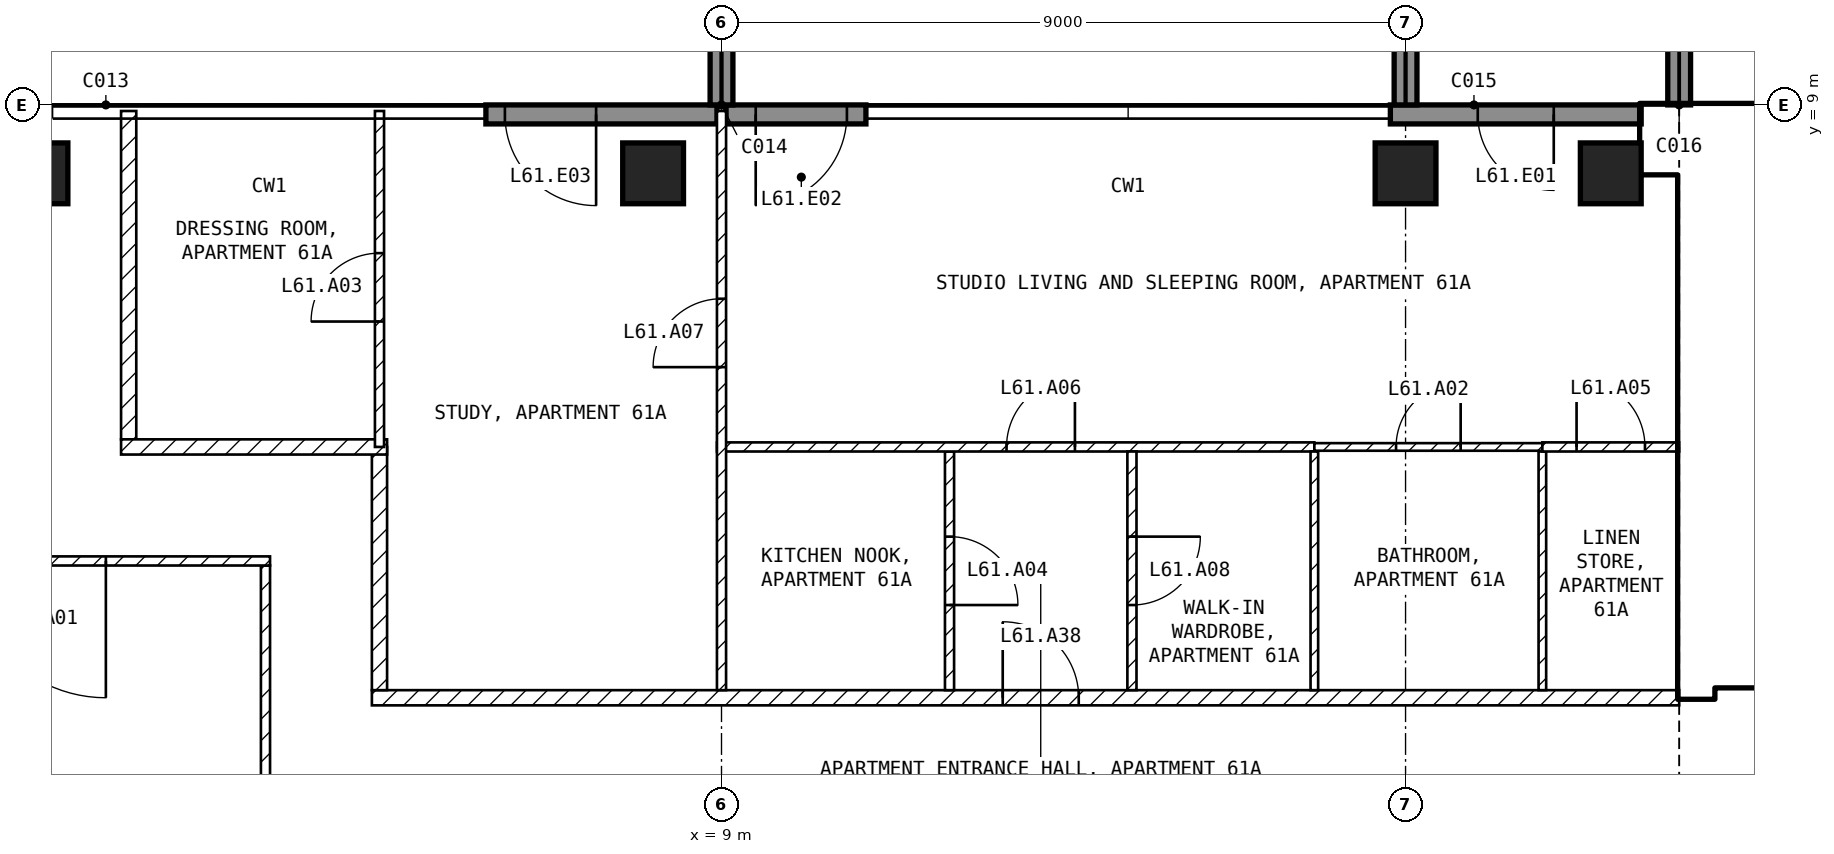
"""IFC4 building model, lengths in metres.
Left out: names, types, materials, properties, quantities, classifications, styles, units other than length and angle.
Written with IfcOpenShell. Run it as: python <this file> out.ifc"""

import sys

from ifc_helpers import new_model, si_unit, direction, frame, frame_2d, origin, origin_2d, place, context, subcontext, project, spatial, rectangle, extrude, element, fill, save


model = new_model("IFC4")
c1 = context("Model", 3, precision=1e-05, world=origin(), true_north=direction((0.0, 1.0)))
c2 = subcontext(c1, "Body", "Model", "MODEL_VIEW")
j1 = project(units=[si_unit("LENGTHUNIT", "METRE"), si_unit("PLANEANGLEUNIT", "RADIAN")], contexts=[c1])
p1 = place(None, origin())
s1 = spatial("IfcSite", under=j1, at=p1, CompositionType="ELEMENT")
p2 = place(p1, origin())
s2 = spatial("IfcBuilding", under=s1, at=p2, CompositionType="ELEMENT")
p3 = place(p2, frame((0.0, 0.0, 243.0)))
s3 = spatial("IfcBuildingStorey", under=s2, at=p3, CompositionType="ELEMENT", Elevation=243.0)
for number, where, z_axis, x_axis in (
    (1, (0.0, 8.1, -0.25), (0.0, 0.0, 1.0), (1.0, 0.0, 0.0)),
    (2, (8.1, 8.1, -0.25), (0.0, 0.0, 1.0), (1.0, 0.0, 0.0)),
    (3, (18.0, 8.1, -0.25), (0.0, 0.0, 1.0), (1.0, 0.0, 0.0)),
    (4, (20.7, 8.1, -0.25), (0.0, 0.0, 1.0), (1.0, 0.0, 0.0)),
):
    element("IfcColumn", number, at=place(p3, frame(where, z_axis=z_axis, x_axis=x_axis)), inside=s3, PredefinedType="COLUMN", context=c2, shape_type="SweptSolid", body=[
        extrude(rectangle(XDim=0.8, YDim=0.8, at=origin_2d()), origin(), (0.0, 0.0, 1.0), 3.5),
    ])
p4 = place(p3, frame((21.1, 8.875, 0.0), z_axis=(0.0, 0.0, 1.0), x_axis=(-1.0, 0.0, 0.0)))
e5 = element("IfcWall", 5, at=p4, inside=s3, PredefinedType="SOLIDWALL", context=c2, shape_type="SweptSolid", body=[
    extrude(rectangle(XDim=3.3, YDim=0.25, at=frame_2d((1.65, 0.0))), origin(), (0.0, 0.0, 1.0), 3.25),
])
p5 = place(p4, frame((1.15, 0.0, 0.0)))
e6 = element("IfcOpeningElement", 6, at=p5, cuts=e5, PredefinedType="OPENING", context=c2, shape_type="SweptSolid", body=[
    extrude(rectangle(XDim=1.0, YDim=2.4, at=frame_2d((0.5, 1.2))), frame((0.0, 0.135, 0.0), z_axis=(0.0, -1.0, 0.0), x_axis=(1.0, 0.0, 0.0)), (0.0, 0.0, 1.0), 0.27),
])
p6 = place(p3, frame((10.9, 8.875, 0.0), z_axis=(0.0, 0.0, 1.0), x_axis=(-1.0, 0.0, 0.0)))
e7 = element("IfcWall", 7, at=p6, inside=s3, PredefinedType="SOLIDWALL", context=c2, shape_type="SweptSolid", body=[
    extrude(rectangle(XDim=1.84, YDim=0.25, at=frame_2d((0.92, 0.0))), origin(), (0.0, 0.0, 1.0), 3.25),
])
p7 = place(p6, frame((0.25, 0.0, 0.0)))
e8 = element("IfcOpeningElement", 8, at=p7, cuts=e7, PredefinedType="OPENING", context=c2, shape_type="SweptSolid", body=[
    extrude(rectangle(XDim=1.2, YDim=2.4, at=frame_2d((0.6, 1.2))), frame((0.0, 0.135, 0.0), z_axis=(0.0, -1.0, 0.0), x_axis=(1.0, 0.0, 0.0)), (0.0, 0.0, 1.0), 0.27),
])
p8 = place(p3, frame((8.94, 8.875, 0.0), z_axis=(0.0, 0.0, 1.0), x_axis=(-1.0, 0.0, 0.0)))
e9 = element("IfcWall", 9, at=p8, inside=s3, PredefinedType="SOLIDWALL", context=c2, shape_type="SweptSolid", body=[
    extrude(rectangle(XDim=3.04, YDim=0.25, at=frame_2d((1.52, 0.0))), origin(), (0.0, 0.0, 1.0), 3.25),
])
p9 = place(p8, frame((1.59, 0.0, 0.0)))
e10 = element("IfcOpeningElement", 10, at=p9, cuts=e9, PredefinedType="OPENING", context=c2, shape_type="SweptSolid", body=[
    extrude(rectangle(XDim=1.2, YDim=2.4, at=frame_2d((0.6, 1.2))), frame((0.0, 0.135, 0.0), z_axis=(0.0, -1.0, 0.0), x_axis=(1.0, 0.0, 0.0)), (0.0, 0.0, 1.0), 0.27),
])
for number, where, z_axis, x_axis in (
    (11, (9.0, 9.0, 0.0), (0.0, 0.0, 1.0), (0.0, 1.0, 0.0)),
    (12, (18.0, 9.0, 0.0), (0.0, 0.0, 1.0), (0.0, 1.0, 0.0)),
    (13, (21.6, 9.0, 0.0), (0.0, 0.0, 1.0), (0.0, 1.0, 0.0)),
):
    element("IfcWall", number, at=place(p3, frame(where, z_axis=z_axis, x_axis=x_axis)), inside=s3, PredefinedType="SOLIDWALL", context=c2, shape_type="SweptSolid", body=[
        extrude(rectangle(XDim=2.7, YDim=0.3, at=frame_2d((1.35, 0.0))), origin(), (0.0, 0.0, 1.0), 3.25),
    ])
p10 = place(p3, frame((21.1, 8.55, 0.0), z_axis=(0.0, 0.0, 1.0), x_axis=(1.0, 0.0, 0.0)))
e14 = element("IfcWall", 14, at=p10, inside=s3, PredefinedType="SHEAR", context=c2, shape_type="SweptSolid", body=[
    extrude(rectangle(XDim=8.65, YDim=0.9, at=frame_2d((4.325, 0.0))), origin(), (0.0, 0.0, 1.0), 3.25),
])
p11 = place(p3, frame((21.825, 1.2, 0.0), z_axis=(0.0, 0.0, 1.0), x_axis=(0.0, 1.0, 0.0)))
e15 = element("IfcWall", 15, at=p11, inside=s3, PredefinedType="SHEAR", context=c2, shape_type="SweptSolid", body=[
    extrude(rectangle(XDim=6.9, YDim=0.45, at=frame_2d((3.45, 0.0))), origin(), (0.0, 0.0, 1.0), 3.25),
])
p12 = place(p3, frame((22.05, 1.45, 0.0), z_axis=(0.0, 0.0, 1.0), x_axis=(1.0, 0.0, 0.0)))
e16 = element("IfcWall", 16, at=p12, inside=s3, PredefinedType="SOLIDWALL", context=c2, shape_type="SweptSolid", body=[
    extrude(rectangle(XDim=11.3, YDim=0.2, at=frame_2d((5.65, 0.0))), origin(), (0.0, 0.0, 1.0), 3.25),
])
p13 = place(p12, frame((0.75, 0.0, 0.0)))
e17 = element("IfcOpeningElement", 17, at=p13, cuts=e16, PredefinedType="OPENING", context=c2, shape_type="SweptSolid", body=[
    extrude(rectangle(XDim=1.0, YDim=2.1, at=frame_2d((0.5, 1.05))), frame((0.0, 0.11, 0.0), z_axis=(0.0, -1.0, 0.0), x_axis=(1.0, 0.0, 0.0)), (0.0, 0.0, 1.0), 0.22),
])
p14 = place(p12, frame((3.25, 0.0, 0.0)))
e18 = element("IfcOpeningElement", 18, at=p14, cuts=e16, PredefinedType="OPENING", context=c2, shape_type="SweptSolid", body=[
    extrude(rectangle(XDim=1.0, YDim=2.1, at=frame_2d((0.5, 1.05))), frame((0.0, 0.11, 0.0), z_axis=(0.0, -1.0, 0.0), x_axis=(1.0, 0.0, 0.0)), (0.0, 0.0, 1.0), 0.22),
])
p15 = place(p12, frame((9.225, 0.0, 0.0)))
e19 = element("IfcOpeningElement", 19, at=p15, cuts=e16, PredefinedType="OPENING", context=c2, shape_type="SweptSolid", body=[
    extrude(rectangle(XDim=0.9, YDim=2.1, at=frame_2d((0.45, 1.05))), frame((0.0, 0.11, 0.0), z_axis=(0.0, -1.0, 0.0), x_axis=(1.0, 0.0, 0.0)), (0.0, 0.0, 1.0), 0.22),
])
p16 = place(p3, frame((22.05, 5.15, 0.0), z_axis=(0.0, 0.0, 1.0), x_axis=(1.0, 0.0, 0.0)))
e20 = element("IfcWall", 20, at=p16, inside=s3, PredefinedType="SOLIDWALL", context=c2, shape_type="SweptSolid", body=[
    extrude(rectangle(XDim=6.3, YDim=0.2, at=frame_2d((3.15, 0.0))), origin(), (0.0, 0.0, 1.0), 3.25),
])
p17 = place(p16, frame((0.2, 0.0, 0.0)))
e21 = element("IfcOpeningElement", 21, at=p17, cuts=e20, PredefinedType="OPENING", context=c2, shape_type="SweptSolid", body=[
    extrude(rectangle(XDim=1.0, YDim=2.1, at=frame_2d((0.5, 1.05))), frame((0.0, 0.11, 0.0), z_axis=(0.0, -1.0, 0.0), x_axis=(1.0, 0.0, 0.0)), (0.0, 0.0, 1.0), 0.22),
])
p18 = place(p3, frame((3.0, -2.94, 0.0), z_axis=(0.0, 0.0, 1.0), x_axis=(0.0, 1.0, 0.0)))
e22 = element("IfcWall", 22, at=p18, inside=s3, PredefinedType="PARTITIONING", context=c2, shape_type="SweptSolid", body=[
    extrude(rectangle(XDim=5.88, YDim=0.12, at=frame_2d((2.94, 0.0))), origin(), (0.0, 0.0, 1.0), 3.25),
])
p19 = place(p3, frame((3.06, 3.0, 0.0), z_axis=(0.0, 0.0, 1.0), x_axis=(-1.0, 0.0, 0.0)))
e23 = element("IfcWall", 23, at=p19, inside=s3, PredefinedType="PARTITIONING", context=c2, shape_type="SweptSolid", body=[
    extrude(rectangle(XDim=6.12, YDim=0.12, at=frame_2d((3.06, 0.0))), origin(), (0.0, 0.0, 1.0), 3.25),
])
p20 = place(p19, frame((2.16, 0.0, 0.0)))
e24 = element("IfcOpeningElement", 24, at=p20, cuts=e23, PredefinedType="OPENING", context=c2, shape_type="SweptSolid", body=[
    extrude(rectangle(XDim=1.8, YDim=2.1, at=frame_2d((0.9, 1.05))), frame((0.0, 0.07, 0.0), z_axis=(0.0, -1.0, 0.0), x_axis=(1.0, 0.0, 0.0)), (0.0, 0.0, 1.0), 0.14),
])
p21 = place(p3, frame((4.4, 1.2, 0.0), z_axis=(0.0, 0.0, 1.0), x_axis=(1.0, 0.0, 0.0)))
e25 = element("IfcWall", 25, at=p21, inside=s3, PredefinedType="PARTITIONING", context=c2, shape_type="SweptSolid", body=[
    extrude(rectangle(XDim=17.2, YDim=0.2, at=frame_2d((8.6, 0.0))), origin(), (0.0, 0.0, 1.0), 3.25),
])
p22 = place(p21, frame((8.3, 0.0, 0.0)))
e26 = element("IfcOpeningElement", 26, at=p22, cuts=e25, PredefinedType="OPENING", context=c2, shape_type="SweptSolid", body=[
    extrude(rectangle(XDim=1.0, YDim=2.1, at=frame_2d((0.5, 1.05))), frame((0.0, 0.11, 0.0), z_axis=(0.0, -1.0, 0.0), x_axis=(1.0, 0.0, 0.0)), (0.0, 0.0, 1.0), 0.22),
])
p23 = place(p3, frame((4.5, 4.5, 0.0), z_axis=(0.0, 0.0, 1.0), x_axis=(0.0, -1.0, 0.0)))
e27 = element("IfcWall", 27, at=p23, inside=s3, PredefinedType="PARTITIONING", context=c2, shape_type="SweptSolid", body=[
    extrude(rectangle(XDim=3.2, YDim=0.2, at=frame_2d((1.6, 0.0))), origin(), (0.0, 0.0, 1.0), 3.25),
])
p24 = place(p3, frame((1.2, 8.92, 0.0), z_axis=(0.0, 0.0, 1.0), x_axis=(0.0, -1.0, 0.0)))
e28 = element("IfcWall", 28, at=p24, inside=s3, PredefinedType="PARTITIONING", context=c2, shape_type="SweptSolid", body=[
    extrude(rectangle(XDim=4.32, YDim=0.2, at=frame_2d((2.16, 0.0))), origin(), (0.0, 0.0, 1.0), 3.25),
])
p25 = place(p3, frame((1.1, 4.5, 0.0), z_axis=(0.0, 0.0, 1.0), x_axis=(1.0, 0.0, 0.0)))
e29 = element("IfcWall", 29, at=p25, inside=s3, PredefinedType="PARTITIONING", context=c2, shape_type="SweptSolid", body=[
    extrude(rectangle(XDim=3.5, YDim=0.2, at=frame_2d((1.75, 0.0))), origin(), (0.0, 0.0, 1.0), 3.25),
])
p26 = place(p3, frame((12.0, 4.44, 0.0), z_axis=(0.0, 0.0, 1.0), x_axis=(0.0, -1.0, 0.0)))
e30 = element("IfcWall", 30, at=p26, inside=s3, PredefinedType="PARTITIONING", context=c2, shape_type="SweptSolid", body=[
    extrude(rectangle(XDim=3.14, YDim=0.12, at=frame_2d((1.57, 0.0))), origin(), (0.0, 0.0, 1.0), 3.25),
])
p27 = place(p26, frame((1.12, 0.0, 0.0)))
e31 = element("IfcOpeningElement", 31, at=p27, cuts=e30, PredefinedType="OPENING", context=c2, shape_type="SweptSolid", body=[
    extrude(rectangle(XDim=0.9, YDim=2.1, at=frame_2d((0.45, 1.05))), frame((0.0, 0.07, 0.0), z_axis=(0.0, -1.0, 0.0), x_axis=(1.0, 0.0, 0.0)), (0.0, 0.0, 1.0), 0.14),
])
p28 = place(p3, frame((8.94, 4.5, 0.0), z_axis=(0.0, 0.0, 1.0), x_axis=(1.0, 0.0, 0.0)))
e32 = element("IfcWall", 32, at=p28, inside=s3, PredefinedType="PARTITIONING", context=c2, shape_type="SweptSolid", body=[
    extrude(rectangle(XDim=7.86, YDim=0.12, at=frame_2d((3.93, 0.0))), origin(), (0.0, 0.0, 1.0), 3.25),
])
p29 = place(p28, frame((3.81, 0.0, 0.0)))
e33 = element("IfcOpeningElement", 33, at=p29, cuts=e32, PredefinedType="OPENING", context=c2, shape_type="SweptSolid", body=[
    extrude(rectangle(XDim=0.9, YDim=2.1, at=frame_2d((0.45, 1.05))), frame((0.0, 0.07, 0.0), z_axis=(0.0, -1.0, 0.0), x_axis=(1.0, 0.0, 0.0)), (0.0, 0.0, 1.0), 0.14),
])
p30 = place(p3, frame((9.0, 1.3, 0.0), z_axis=(0.0, 0.0, 1.0), x_axis=(0.0, 1.0, 0.0)))
e34 = element("IfcWall", 34, at=p30, inside=s3, PredefinedType="PARTITIONING", context=c2, shape_type="SweptSolid", body=[
    extrude(rectangle(XDim=7.62, YDim=0.12, at=frame_2d((3.81, 0.0))), origin(), (0.0, 0.0, 1.0), 3.25),
])
p31 = place(p30, frame((4.25, 0.0, 0.0)))
e35 = element("IfcOpeningElement", 35, at=p31, cuts=e34, PredefinedType="OPENING", context=c2, shape_type="SweptSolid", body=[
    extrude(rectangle(XDim=0.9, YDim=2.1, at=frame_2d((0.45, 1.05))), frame((0.0, 0.07, 0.0), z_axis=(0.0, -1.0, 0.0), x_axis=(1.0, 0.0, 0.0)), (0.0, 0.0, 1.0), 0.14),
])
p32 = place(p3, frame((14.4, 4.44, 0.0), z_axis=(0.0, 0.0, 1.0), x_axis=(0.0, -1.0, 0.0)))
e36 = element("IfcWall", 36, at=p32, inside=s3, PredefinedType="PARTITIONING", context=c2, shape_type="SweptSolid", body=[
    extrude(rectangle(XDim=3.14, YDim=0.12, at=frame_2d((1.57, 0.0))), origin(), (0.0, 0.0, 1.0), 3.25),
])
p33 = place(p32, frame((1.12, 0.0, 0.0)))
e37 = element("IfcOpeningElement", 37, at=p33, cuts=e36, PredefinedType="OPENING", context=c2, shape_type="SweptSolid", body=[
    extrude(rectangle(XDim=0.9, YDim=2.1, at=frame_2d((0.45, 1.05))), frame((0.0, 0.07, 0.0), z_axis=(0.0, -1.0, 0.0), x_axis=(1.0, 0.0, 0.0)), (0.0, 0.0, 1.0), 0.14),
])
for number, where, z_axis, x_axis in (
    (38, (16.8, 4.44, 0.0), (0.0, 0.0, 1.0), (0.0, -1.0, 0.0)),
    (39, (19.8, 4.44, 0.0), (0.0, 0.0, 1.0), (0.0, -1.0, 0.0)),
):
    element("IfcWall", number, at=place(p3, frame(where, z_axis=z_axis, x_axis=x_axis)), inside=s3, PredefinedType="PARTITIONING", context=c2, shape_type="SweptSolid", body=[
        extrude(rectangle(XDim=3.14, YDim=0.1, at=frame_2d((1.57, 0.0))), origin(), (0.0, 0.0, 1.0), 3.25),
    ])
p34 = place(p3, frame((16.8, 4.5, 0.0), z_axis=(0.0, 0.0, 1.0), x_axis=(1.0, 0.0, 0.0)))
e40 = element("IfcWall", 40, at=p34, inside=s3, PredefinedType="PARTITIONING", context=c2, shape_type="SweptSolid", body=[
    extrude(rectangle(XDim=3.0, YDim=0.1, at=frame_2d((1.5, 0.0))), origin(), (0.0, 0.0, 1.0), 3.25),
])
p35 = place(p34, frame((1.075, 0.0, 0.0)))
e41 = element("IfcOpeningElement", 41, at=p35, cuts=e40, PredefinedType="OPENING", context=c2, shape_type="SweptSolid", body=[
    extrude(rectangle(XDim=0.85, YDim=2.1, at=frame_2d((0.425, 1.05))), frame((0.0, 0.06, 0.0), z_axis=(0.0, -1.0, 0.0), x_axis=(1.0, 0.0, 0.0)), (0.0, 0.0, 1.0), 0.12),
])
p36 = place(p3, frame((19.8, 4.5, 0.0), z_axis=(0.0, 0.0, 1.0), x_axis=(1.0, 0.0, 0.0)))
e42 = element("IfcWall", 42, at=p36, inside=s3, PredefinedType="PARTITIONING", context=c2, shape_type="SweptSolid", body=[
    extrude(rectangle(XDim=1.8, YDim=0.12, at=frame_2d((0.9, 0.0))), origin(), (0.0, 0.0, 1.0), 3.25),
])
p37 = place(p36, frame((0.45, 0.0, 0.0)))
e43 = element("IfcOpeningElement", 43, at=p37, cuts=e42, PredefinedType="OPENING", context=c2, shape_type="SweptSolid", body=[
    extrude(rectangle(XDim=0.9, YDim=2.1, at=frame_2d((0.45, 1.05))), frame((0.0, 0.07, 0.0), z_axis=(0.0, -1.0, 0.0), x_axis=(1.0, 0.0, 0.0)), (0.0, 0.0, 1.0), 0.14),
])
p38 = place(p3, frame((4.5, 4.5, 0.0), z_axis=(0.0, 0.0, 1.0), x_axis=(0.0, 1.0, 0.0)))
e44 = element("IfcWall", 44, at=p38, inside=s3, PredefinedType="PARTITIONING", context=c2, shape_type="SweptSolid", body=[
    extrude(rectangle(XDim=4.42, YDim=0.12, at=frame_2d((2.21, 0.0))), origin(), (0.0, 0.0, 1.0), 3.25),
])
p39 = place(p38, frame((1.65, 0.0, 0.0)))
e45 = element("IfcOpeningElement", 45, at=p39, cuts=e44, PredefinedType="OPENING", context=c2, shape_type="SweptSolid", body=[
    extrude(rectangle(XDim=0.9, YDim=2.1, at=frame_2d((0.45, 1.05))), frame((0.0, 0.07, 0.0), z_axis=(0.0, -1.0, 0.0), x_axis=(1.0, 0.0, 0.0)), (0.0, 0.0, 1.0), 0.14),
])
p40 = place(p5, origin())
e46 = element("IfcDoor", 46, at=p40, inside=s3, OperationType="SINGLE_SWING_LEFT", PredefinedType="DOOR", context=c2, shape_type="SweptSolid", body=[
    extrude(rectangle(XDim=1.0, YDim=2.4, at=frame_2d((0.5, 1.2))), frame((0.0, 0.025, 0.0), z_axis=(0.0, -1.0, 0.0), x_axis=(1.0, 0.0, 0.0)), (0.0, 0.0, 1.0), 0.05),
])
fill(e6, e46)
p41 = place(p7, origin())
e47 = element("IfcDoor", 47, at=p41, inside=s3, OperationType="SINGLE_SWING_RIGHT", PredefinedType="DOOR", context=c2, shape_type="SweptSolid", body=[
    extrude(rectangle(XDim=1.2, YDim=2.4, at=frame_2d((0.6, 1.2))), frame((0.0, 0.025, 0.0), z_axis=(0.0, -1.0, 0.0), x_axis=(1.0, 0.0, 0.0)), (0.0, 0.0, 1.0), 0.05),
])
fill(e8, e47)
p42 = place(p9, origin())
e48 = element("IfcDoor", 48, at=p42, inside=s3, OperationType="SINGLE_SWING_LEFT", PredefinedType="DOOR", context=c2, shape_type="SweptSolid", body=[
    extrude(rectangle(XDim=1.2, YDim=2.4, at=frame_2d((0.6, 1.2))), frame((0.0, 0.025, 0.0), z_axis=(0.0, -1.0, 0.0), x_axis=(1.0, 0.0, 0.0)), (0.0, 0.0, 1.0), 0.05),
])
fill(e10, e48)
p43 = place(p17, origin())
e49 = element("IfcDoor", 49, at=p43, inside=s3, OperationType="SINGLE_SWING_LEFT", PredefinedType="DOOR", context=c2, shape_type="SweptSolid", body=[
    extrude(rectangle(XDim=1.0, YDim=2.1, at=frame_2d((0.5, 1.05))), frame((0.0, 0.025, 0.0), z_axis=(0.0, -1.0, 0.0), x_axis=(1.0, 0.0, 0.0)), (0.0, 0.0, 1.0), 0.05),
])
fill(e21, e49)
p44 = place(p20, origin())
e50 = element("IfcDoor", 50, at=p44, inside=s3, OperationType="SINGLE_SWING_LEFT", PredefinedType="DOOR", context=c2, shape_type="SweptSolid", body=[
    extrude(rectangle(XDim=1.8, YDim=2.1, at=frame_2d((0.9, 1.05))), frame((0.0, 0.025, 0.0), z_axis=(0.0, -1.0, 0.0), x_axis=(1.0, 0.0, 0.0)), (0.0, 0.0, 1.0), 0.05),
])
fill(e24, e50)
p45 = place(p35, origin())
e51 = element("IfcDoor", 51, at=p45, inside=s3, OperationType="SINGLE_SWING_RIGHT", PredefinedType="DOOR", context=c2, shape_type="SweptSolid", body=[
    extrude(rectangle(XDim=0.85, YDim=2.1, at=frame_2d((0.425, 1.05))), frame((0.0, 0.025, 0.0), z_axis=(0.0, -1.0, 0.0), x_axis=(1.0, 0.0, 0.0)), (0.0, 0.0, 1.0), 0.05),
])
fill(e41, e51)
p46 = place(p39, origin())
e52 = element("IfcDoor", 52, at=p46, inside=s3, OperationType="SINGLE_SWING_LEFT", PredefinedType="DOOR", context=c2, shape_type="SweptSolid", body=[
    extrude(rectangle(XDim=0.9, YDim=2.1, at=frame_2d((0.45, 1.05))), frame((0.0, 0.025, 0.0), z_axis=(0.0, -1.0, 0.0), x_axis=(1.0, 0.0, 0.0)), (0.0, 0.0, 1.0), 0.05),
])
fill(e45, e52)
p47 = place(p27, origin())
e53 = element("IfcDoor", 53, at=p47, inside=s3, OperationType="SINGLE_SWING_RIGHT", PredefinedType="DOOR", context=c2, shape_type="SweptSolid", body=[
    extrude(rectangle(XDim=0.9, YDim=2.1, at=frame_2d((0.45, 1.05))), frame((0.0, 0.025, 0.0), z_axis=(0.0, -1.0, 0.0), x_axis=(1.0, 0.0, 0.0)), (0.0, 0.0, 1.0), 0.05),
])
fill(e31, e53)
p48 = place(p37, origin())
e54 = element("IfcDoor", 54, at=p48, inside=s3, OperationType="SINGLE_SWING_LEFT", PredefinedType="DOOR", context=c2, shape_type="SweptSolid", body=[
    extrude(rectangle(XDim=0.9, YDim=2.1, at=frame_2d((0.45, 1.05))), frame((0.0, 0.025, 0.0), z_axis=(0.0, -1.0, 0.0), x_axis=(1.0, 0.0, 0.0)), (0.0, 0.0, 1.0), 0.05),
])
fill(e43, e54)
p49 = place(p29, origin())
e55 = element("IfcDoor", 55, at=p49, inside=s3, OperationType="SINGLE_SWING_RIGHT", PredefinedType="DOOR", context=c2, shape_type="SweptSolid", body=[
    extrude(rectangle(XDim=0.9, YDim=2.1, at=frame_2d((0.45, 1.05))), frame((0.0, 0.025, 0.0), z_axis=(0.0, -1.0, 0.0), x_axis=(1.0, 0.0, 0.0)), (0.0, 0.0, 1.0), 0.05),
])
fill(e33, e55)
p50 = place(p31, origin())
e56 = element("IfcDoor", 56, at=p50, inside=s3, OperationType="SINGLE_SWING_LEFT", PredefinedType="DOOR", context=c2, shape_type="SweptSolid", body=[
    extrude(rectangle(XDim=0.9, YDim=2.1, at=frame_2d((0.45, 1.05))), frame((0.0, 0.025, 0.0), z_axis=(0.0, -1.0, 0.0), x_axis=(1.0, 0.0, 0.0)), (0.0, 0.0, 1.0), 0.05),
])
fill(e35, e56)
p51 = place(p33, origin())
e57 = element("IfcDoor", 57, at=p51, inside=s3, OperationType="SINGLE_SWING_LEFT", PredefinedType="DOOR", context=c2, shape_type="SweptSolid", body=[
    extrude(rectangle(XDim=0.9, YDim=2.1, at=frame_2d((0.45, 1.05))), frame((0.0, 0.025, 0.0), z_axis=(0.0, -1.0, 0.0), x_axis=(1.0, 0.0, 0.0)), (0.0, 0.0, 1.0), 0.05),
])
fill(e37, e57)
p52 = place(p22, origin())
e58 = element("IfcDoor", 58, at=p52, inside=s3, OperationType="SINGLE_SWING_LEFT", PredefinedType="DOOR", context=c2, shape_type="SweptSolid", body=[
    extrude(rectangle(XDim=1.0, YDim=2.1, at=frame_2d((0.5, 1.05))), frame((0.0, 0.025, 0.0), z_axis=(0.0, -1.0, 0.0), x_axis=(1.0, 0.0, 0.0)), (0.0, 0.0, 1.0), 0.05),
])
fill(e26, e58)
save(model, sys.argv[1])
